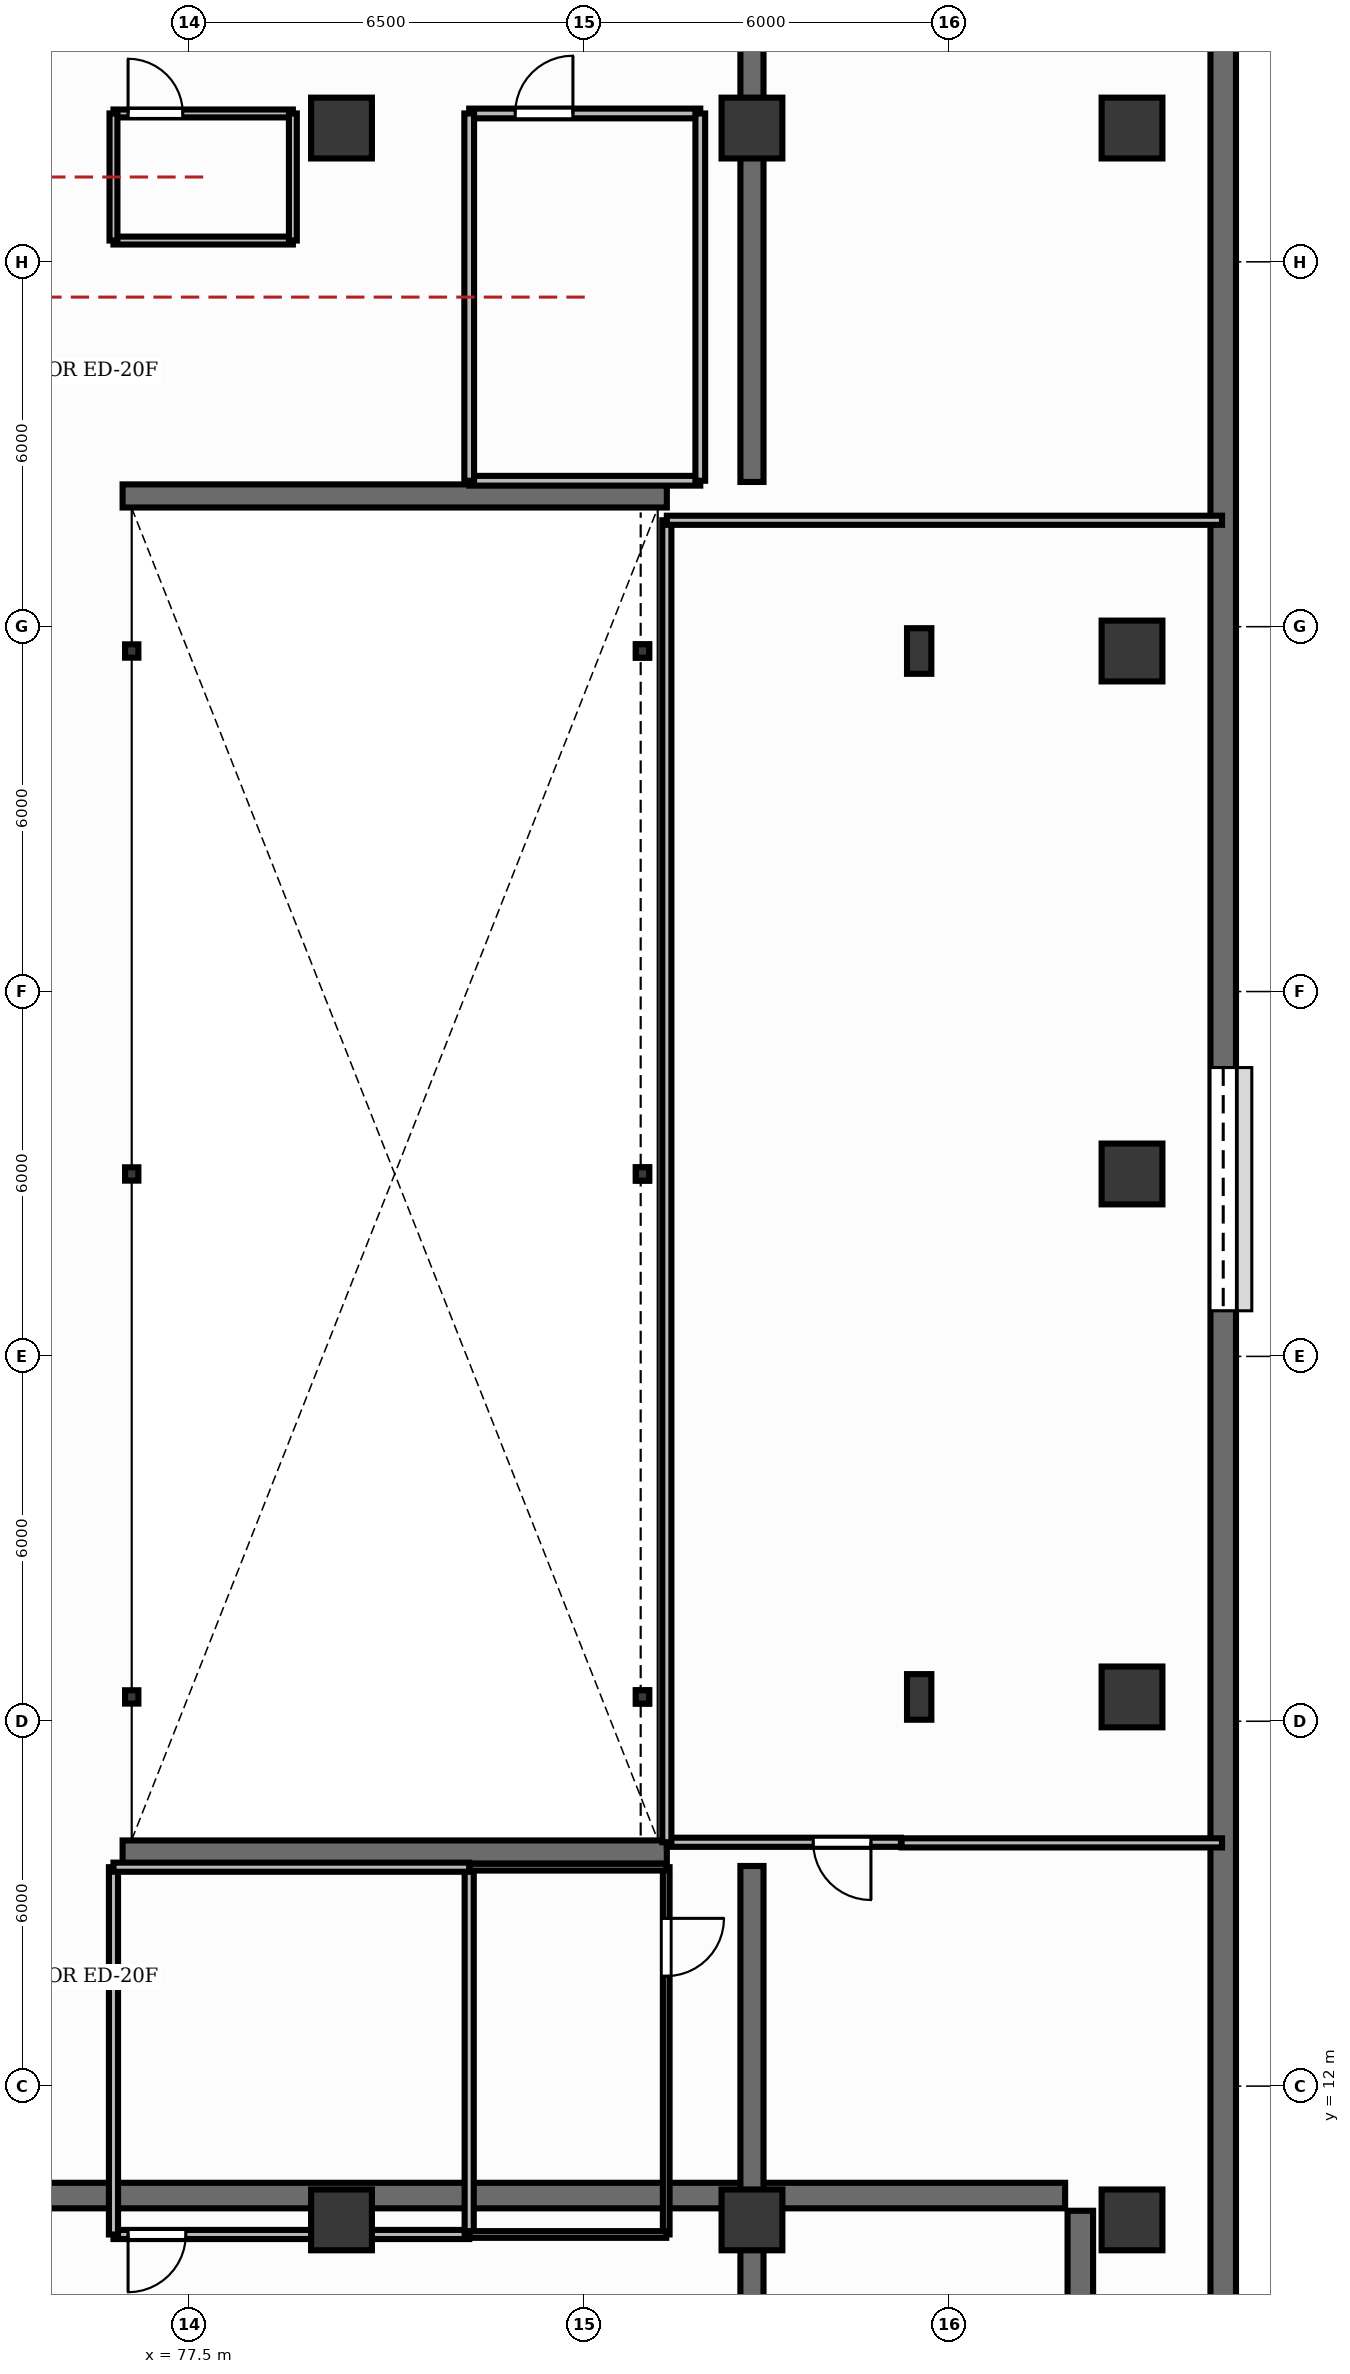
"""IFC4 building model, lengths in metres.
Left out: names, types, materials, properties, quantities, classifications, styles, units other than length and angle.
Written with IfcOpenShell. Run it as: python <this file> out.ifc"""

import sys

from ifc_helpers import new_model, si_unit, direction, frame, frame_2d, origin, origin_2d, place, context, subcontext, project, spatial, rectangle, hollow_circle, i_section, extrude, element, fill, save


model = new_model("IFC4")
c1 = context("Model", 3, precision=1e-05, world=origin(), true_north=direction((0.0, 1.0)))
c2 = subcontext(c1, "Body", "Model", "MODEL_VIEW")
j1 = project(units=[si_unit("LENGTHUNIT", "METRE"), si_unit("PLANEANGLEUNIT", "RADIAN")], contexts=[c1])
p1 = place(None, origin())
s1 = spatial("IfcSite", under=j1, at=p1, CompositionType="ELEMENT")
p2 = place(p1, origin())
s2 = spatial("IfcBuilding", under=s1, at=p2, CompositionType="ELEMENT")
p3 = place(p2, origin())
s3 = spatial("IfcBuildingStorey", under=s2, at=p3, CompositionType="ELEMENT", Elevation=0.0)
p4 = place(p3, frame((64.5, 10.2, 0.0), z_axis=(0.0, 0.0, 1.0), x_axis=(1.0, 0.0, 0.0)))
e1 = element("IfcWall", 1, at=p4, inside=s3, PredefinedType="SHEAR", context=c2, shape_type="SweptSolid", body=[
    extrude(rectangle(XDim=27.4, YDim=0.42, at=frame_2d((13.7, 0.0))), origin(), (0.0, 0.0, 1.0), 3.8),
])
p5 = place(p3, frame((92.15, 3.225, 0.0), z_axis=(0.0, 0.0, 1.0), x_axis=(0.0, 1.0, 0.0)))
e2 = element("IfcWall", 2, at=p5, inside=s3, PredefinedType="SHEAR", context=c2, shape_type="SweptSolid", body=[
    extrude(rectangle(XDim=6.725, YDim=0.42, at=frame_2d((3.362, 0.0))), origin(), (0.0, 0.0, 1.0), 3.8),
])
for number, where, z_axis, x_axis in (
    (3, (80.0, 9.8, 0.0), (0.0, 0.0, 1.0), (1.0, 0.0, 0.0)),
    (4, (80.0, 44.2, 0.0), (0.0, 0.0, 1.0), (1.0, 0.0, 0.0)),
    (5, (86.75, 9.8, 0.0), (0.0, 0.0, 1.0), (1.0, 0.0, 0.0)),
    (6, (86.75, 44.2, 0.0), (0.0, 0.0, 1.0), (1.0, 0.0, 0.0)),
    (7, (93.0, 9.8, 0.0), (0.0, 0.0, 1.0), (1.0, 0.0, 0.0)),
    (8, (93.0, 18.4, 0.0), (0.0, 0.0, 1.0), (1.0, 0.0, 0.0)),
    (9, (93.0, 27.0, 0.0), (0.0, 0.0, 1.0), (1.0, 0.0, 0.0)),
    (10, (93.0, 35.6, 0.0), (0.0, 0.0, 1.0), (1.0, 0.0, 0.0)),
    (11, (93.0, 44.2, 0.0), (0.0, 0.0, 1.0), (1.0, 0.0, 0.0)),
):
    element("IfcColumn", number, at=place(p3, frame(where, z_axis=z_axis, x_axis=x_axis)), inside=s3, PredefinedType="COLUMN", context=c2, shape_type="SweptSolid", body=[
        extrude(rectangle(XDim=1.0, YDim=1.0, at=origin_2d()), origin(), (0.0, 0.0, 1.0), 5.1),
    ])
for number, where, z_axis, x_axis in (
    (12, (89.5, 18.4, 0.0), (0.0, 0.0, 1.0), (1.0, 0.0, 0.0)),
    (13, (89.5, 35.6, 0.0), (0.0, 0.0, 1.0), (1.0, 0.0, 0.0)),
):
    element("IfcColumn", number, at=place(p3, frame(where, z_axis=z_axis, x_axis=x_axis)), inside=s3, PredefinedType="COLUMN", context=c2, shape_type="SweptSolid", body=[
        extrude(i_section(OverallWidth=0.4, OverallDepth=0.75, WebThickness=0.016, FlangeThickness=0.028, at=origin_2d()), origin(), (0.0, 0.0, 1.0), 5.1),
    ])
p6 = place(p3, frame((94.5, 46.75, 0.0), z_axis=(0.0, 0.0, 1.0), x_axis=(0.0, -1.0, 0.0)))
e14 = element("IfcWall", 14, at=p6, inside=s3, PredefinedType="SHEAR", context=c2, shape_type="SweptSolid", body=[
    extrude(rectangle(XDim=39.5, YDim=0.42, at=frame_2d((19.75, 0.0))), origin(), (0.0, 0.0, 1.0), 5.1),
])
p7 = place(p6, frame((18.0, 0.0, 0.0)))
e15 = element("IfcOpeningElement", 15, at=p7, cuts=e14, PredefinedType="OPENING", context=c2, shape_type="SweptSolid", body=[
    extrude(rectangle(XDim=4.0, YDim=4.2, at=frame_2d((2.0, 2.1))), frame((0.0, 0.225, 0.0), z_axis=(0.0, -1.0, 0.0), x_axis=(1.0, 0.0, 0.0)), (0.0, 0.0, 1.0), 0.45),
])
for number, where, z_axis, x_axis in (
    (16, (86.75, 38.38, 0.0), (0.0, 0.0, 1.0), (0.0, 1.0, 0.0)),
    (17, (86.75, 7.21, 0.0), (0.0, 0.0, 1.0), (0.0, 1.0, 0.0)),
):
    element("IfcWall", number, at=place(p3, frame(where, z_axis=z_axis, x_axis=x_axis)), inside=s3, PredefinedType="SHEAR", context=c2, shape_type="SweptSolid", body=[
        extrude(rectangle(XDim=8.41, YDim=0.38, at=frame_2d((4.205, 0.0))), origin(), (0.0, 0.0, 1.0), 5.1),
    ])
for number, where, z_axis, x_axis in (
    (18, (76.4, 15.85, 0.0), (0.0, 0.0, 1.0), (1.0, 0.0, 0.0)),
    (19, (76.4, 38.15, 0.0), (0.0, 0.0, 1.0), (1.0, 0.0, 0.0)),
):
    element("IfcWall", number, at=place(p3, frame(where, z_axis=z_axis, x_axis=x_axis)), inside=s3, PredefinedType="SHEAR", context=c2, shape_type="SweptSolid", body=[
        extrude(rectangle(XDim=8.95, YDim=0.38, at=frame_2d((4.475, 0.0))), origin(), (0.0, 0.0, 1.0), 5.1),
    ])
for number, where, z_axis, x_axis in (
    (20, (84.95, 18.4, -0.32), (0.0, 0.0, 1.0), (1.0, 0.0, 0.0)),
    (21, (84.95, 27.0, -0.32), (0.0, 0.0, 1.0), (1.0, 0.0, 0.0)),
    (22, (84.95, 35.6, -0.32), (0.0, 0.0, 1.0), (1.0, 0.0, 0.0)),
):
    element("IfcColumn", number, at=place(p3, frame(where, z_axis=z_axis, x_axis=x_axis)), inside=s3, PredefinedType="COLUMN", context=c2, shape_type="SweptSolid", body=[
        extrude(hollow_circle(Radius=0.11, WallThickness=0.012, at=origin_2d()), origin(), (0.0, 0.0, 1.0), 1.807),
    ])
p8 = place(p3, frame((84.95, 18.4, 1.487), z_axis=(0.0, 0.0, 1.0), x_axis=(1.0, 0.0, 0.0)))
e23 = element("IfcColumn", 23, at=p8, inside=s3, PredefinedType="COLUMN", context=c2, shape_type="SweptSolid", body=[
    extrude(hollow_circle(Radius=0.11, WallThickness=0.012, at=origin_2d()), origin(), (0.0, 0.0, 1.0), 4.68),
])
p9 = place(p3, frame((76.55, 18.4, -0.725), z_axis=(0.0, 0.0, 1.0), x_axis=(1.0, 0.0, 0.0)))
e24 = element("IfcColumn", 24, at=p9, inside=s3, PredefinedType="COLUMN", context=c2, shape_type="SweptSolid", body=[
    extrude(hollow_circle(Radius=0.11, WallThickness=0.012, at=origin_2d()), origin(), (0.0, 0.0, 1.0), 5.4),
])
p10 = place(p3, frame((84.95, 27.0, 1.487), z_axis=(0.0, 0.0, 1.0), x_axis=(1.0, 0.0, 0.0)))
e25 = element("IfcColumn", 25, at=p10, inside=s3, PredefinedType="COLUMN", context=c2, shape_type="SweptSolid", body=[
    extrude(hollow_circle(Radius=0.11, WallThickness=0.012, at=origin_2d()), origin(), (0.0, 0.0, 1.0), 4.68),
])
p11 = place(p3, frame((76.55, 27.0, -0.725), z_axis=(0.0, 0.0, 1.0), x_axis=(1.0, 0.0, 0.0)))
e26 = element("IfcColumn", 26, at=p11, inside=s3, PredefinedType="COLUMN", context=c2, shape_type="SweptSolid", body=[
    extrude(hollow_circle(Radius=0.11, WallThickness=0.012, at=origin_2d()), origin(), (0.0, 0.0, 1.0), 5.4),
])
p12 = place(p3, frame((84.95, 35.6, 1.487), z_axis=(0.0, 0.0, 1.0), x_axis=(1.0, 0.0, 0.0)))
e27 = element("IfcColumn", 27, at=p12, inside=s3, PredefinedType="COLUMN", context=c2, shape_type="SweptSolid", body=[
    extrude(hollow_circle(Radius=0.11, WallThickness=0.012, at=origin_2d()), origin(), (0.0, 0.0, 1.0), 4.68),
])
p13 = place(p3, frame((76.55, 35.6, -0.725), z_axis=(0.0, 0.0, 1.0), x_axis=(1.0, 0.0, 0.0)))
e28 = element("IfcColumn", 28, at=p13, inside=s3, PredefinedType="COLUMN", context=c2, shape_type="SweptSolid", body=[
    extrude(hollow_circle(Radius=0.11, WallThickness=0.012, at=origin_2d()), origin(), (0.0, 0.0, 1.0), 5.4),
])
p14 = place(p3, frame((76.25, 44.44, 0.0), z_axis=(0.0, 0.0, 1.0), x_axis=(1.0, 0.0, 0.0)))
e29 = element("IfcWall", 29, at=p14, inside=s3, PredefinedType="PARTITIONING", context=c2, shape_type="SweptSolid", body=[
    extrude(rectangle(XDim=2.95, YDim=0.13, at=frame_2d((1.475, 0.0))), origin(), (0.0, 0.0, 1.0), 4.11),
])
p15 = place(p14, frame((0.24, 0.0, 0.0)))
e30 = element("IfcOpeningElement", 30, at=p15, cuts=e29, PredefinedType="OPENING", context=c2, shape_type="SweptSolid", body=[
    extrude(rectangle(XDim=0.9, YDim=2.15, at=frame_2d((0.45, 1.075))), frame((0.0, 0.08, 0.0), z_axis=(0.0, -1.0, 0.0), x_axis=(1.0, 0.0, 0.0)), (0.0, 0.0, 1.0), 0.16),
])
p16 = place(p3, frame((82.1, 9.56, 0.0), z_axis=(0.0, 0.0, 1.0), x_axis=(-1.0, 0.0, 0.0)))
e31 = element("IfcWall", 31, at=p16, inside=s3, PredefinedType="PARTITIONING", context=c2, shape_type="SweptSolid", body=[
    extrude(rectangle(XDim=5.85, YDim=0.15, at=frame_2d((2.925, 0.0))), origin(), (0.0, 0.0, 1.0), 4.11),
])
p17 = place(p16, frame((4.66, 0.0, 0.0)))
e32 = element("IfcOpeningElement", 32, at=p17, cuts=e31, PredefinedType="OPENING", context=c2, shape_type="SweptSolid", body=[
    extrude(rectangle(XDim=0.95, YDim=2.15, at=frame_2d((0.475, 1.075))), frame((0.0, 0.09, 0.0), z_axis=(0.0, -1.0, 0.0), x_axis=(1.0, 0.0, 0.0)), (0.0, 0.0, 1.0), 0.18),
])
p18 = place(p3, frame((85.34, 15.6, 0.0), z_axis=(0.0, 0.0, 1.0), x_axis=(0.0, -1.0, 0.0)))
e33 = element("IfcWall", 33, at=p18, inside=s3, PredefinedType="MOVABLE", context=c2, shape_type="SweptSolid", body=[
    extrude(rectangle(XDim=6.04, YDim=0.11, at=frame_2d((3.02, 0.0))), origin(), (0.0, 0.0, 1.0), 4.11),
])
p19 = place(p18, frame((0.841, 0.0, 0.0)))
e34 = element("IfcOpeningElement", 34, at=p19, cuts=e33, PredefinedType="OPENING", context=c2, shape_type="SweptSolid", body=[
    extrude(rectangle(XDim=0.95, YDim=2.15, at=frame_2d((0.475, 1.075))), frame((0.0, 0.07, 0.0), z_axis=(0.0, -1.0, 0.0), x_axis=(1.0, 0.0, 0.0)), (0.0, 0.0, 1.0), 0.14),
])
p20 = place(p3, frame((82.1, 44.44, 0.0), z_axis=(0.0, 0.0, 1.0), x_axis=(1.0, 0.0, 0.0)))
e35 = element("IfcWall", 35, at=p20, inside=s3, PredefinedType="PARTITIONING", context=c2, shape_type="SweptSolid", body=[
    extrude(rectangle(XDim=3.8, YDim=0.16, at=frame_2d((1.9, 0.0))), origin(), (0.0, 0.0, 1.0), 4.11),
])
p21 = place(p20, frame((0.756, 0.0, 0.0)))
e36 = element("IfcOpeningElement", 36, at=p21, cuts=e35, PredefinedType="OPENING", context=c2, shape_type="SweptSolid", body=[
    extrude(rectangle(XDim=0.95, YDim=2.15, at=frame_2d((0.475, 1.075))), frame((0.0, 0.095, 0.0), z_axis=(0.0, -1.0, 0.0), x_axis=(1.0, 0.0, 0.0)), (0.0, 0.0, 1.0), 0.19),
])
p22 = place(p3, frame((89.2, 16.01, 0.0), z_axis=(0.0, 0.0, 1.0), x_axis=(-1.0, 0.0, 0.0)))
e37 = element("IfcWall", 37, at=p22, inside=s3, PredefinedType="PARTITIONING", context=c2, shape_type="SweptSolid", body=[
    extrude(rectangle(XDim=3.85, YDim=0.15, at=frame_2d((1.925, 0.0))), origin(), (0.0, 0.0, 1.0), 4.11),
])
p23 = place(p22, frame((0.493, 0.0, 0.0)))
e38 = element("IfcOpeningElement", 38, at=p23, cuts=e37, PredefinedType="OPENING", context=c2, shape_type="SweptSolid", body=[
    extrude(rectangle(XDim=0.95, YDim=2.15, at=frame_2d((0.475, 1.075))), frame((0.0, 0.09, 0.0), z_axis=(0.0, -1.0, 0.0), x_axis=(1.0, 0.0, 0.0)), (0.0, 0.0, 1.0), 0.18),
])
p24 = place(p3, frame((79.2, 42.35, 0.0), z_axis=(0.0, 0.0, 1.0), x_axis=(-1.0, 0.0, 0.0)))
e39 = element("IfcWall", 39, at=p24, inside=s3, PredefinedType="PARTITIONING", context=c2, shape_type="SweptSolid", body=[
    extrude(rectangle(XDim=2.95, YDim=0.13, at=frame_2d((1.475, 0.0))), origin(), (0.0, 0.0, 1.0), 4.11),
])
for number, where, z_axis, x_axis in (
    (40, (76.25, 42.35, 0.0), (0.0, 0.0, 1.0), (0.0, 1.0, 0.0)),
    (41, (79.2, 44.44, 0.0), (0.0, 0.0, 1.0), (0.0, -1.0, 0.0)),
):
    element("IfcWall", number, at=place(p3, frame(where, z_axis=z_axis, x_axis=x_axis)), inside=s3, PredefinedType="PARTITIONING", context=c2, shape_type="SweptSolid", body=[
        extrude(rectangle(XDim=2.09, YDim=0.13, at=frame_2d((1.045, 0.0))), origin(), (0.0, 0.0, 1.0), 4.11),
    ])
for number, where, z_axis, x_axis in (
    (42, (82.1, 15.6, 0.0), (0.0, 0.0, 1.0), (0.0, -1.0, 0.0)),
    (43, (76.25, 9.56, 0.0), (0.0, 0.0, 1.0), (0.0, 1.0, 0.0)),
):
    element("IfcWall", number, at=place(p3, frame(where, z_axis=z_axis, x_axis=x_axis)), inside=s3, PredefinedType="PARTITIONING", context=c2, shape_type="SweptSolid", body=[
        extrude(rectangle(XDim=6.04, YDim=0.15, at=frame_2d((3.02, 0.0))), origin(), (0.0, 0.0, 1.0), 4.11),
    ])
p25 = place(p3, frame((76.25, 15.6, 0.0), z_axis=(0.0, 0.0, 1.0), x_axis=(1.0, 0.0, 0.0)))
e44 = element("IfcWall", 44, at=p25, inside=s3, PredefinedType="PARTITIONING", context=c2, shape_type="SweptSolid", body=[
    extrude(rectangle(XDim=5.85, YDim=0.15, at=frame_2d((2.925, 0.0))), origin(), (0.0, 0.0, 1.0), 4.11),
])
for number, where, z_axis, x_axis in (
    (45, (85.34, 9.56, 0.0), (0.0, 0.0, 1.0), (-1.0, 0.0, 0.0)),
    (46, (82.11, 15.6, 0.0), (0.0, 0.0, 1.0), (1.0, 0.0, 0.0)),
):
    element("IfcWall", number, at=place(p3, frame(where, z_axis=z_axis, x_axis=x_axis)), inside=s3, PredefinedType="MOVABLE", context=c2, shape_type="SweptSolid", body=[
        extrude(rectangle(XDim=3.23, YDim=0.11, at=frame_2d((1.615, 0.0))), origin(), (0.0, 0.0, 1.0), 4.11),
    ])
p26 = place(p3, frame((85.9, 38.4, 0.0), z_axis=(0.0, 0.0, 1.0), x_axis=(-1.0, 0.0, 0.0)))
e47 = element("IfcWall", 47, at=p26, inside=s3, PredefinedType="PARTITIONING", context=c2, shape_type="SweptSolid", body=[
    extrude(rectangle(XDim=3.8, YDim=0.16, at=frame_2d((1.9, 0.0))), origin(), (0.0, 0.0, 1.0), 4.11),
])
for number, where, z_axis, x_axis in (
    (48, (82.1, 38.4, 0.0), (0.0, 0.0, 1.0), (0.0, 1.0, 0.0)),
    (49, (85.9, 44.44, 0.0), (0.0, 0.0, 1.0), (0.0, -1.0, 0.0)),
):
    element("IfcWall", number, at=place(p3, frame(where, z_axis=z_axis, x_axis=x_axis)), inside=s3, PredefinedType="PARTITIONING", context=c2, shape_type="SweptSolid", body=[
        extrude(rectangle(XDim=6.04, YDim=0.16, at=frame_2d((3.02, 0.0))), origin(), (0.0, 0.0, 1.0), 4.11),
    ])
p27 = place(p3, frame((94.48, 16.0, 0.0), z_axis=(0.0, 0.0, 1.0), x_axis=(-1.0, 0.0, 0.0)))
e50 = element("IfcWall", 50, at=p27, inside=s3, PredefinedType="PARTITIONING", context=c2, shape_type="SweptSolid", body=[
    extrude(rectangle(XDim=5.27, YDim=0.15, at=frame_2d((2.635, 0.0))), origin(), (0.0, 0.0, 1.0), 4.11),
])
p28 = place(p3, frame((85.35, 16.01, 0.0), z_axis=(0.0, 0.0, 1.0), x_axis=(0.0, 1.0, 0.0)))
e51 = element("IfcWall", 51, at=p28, inside=s3, PredefinedType="PARTITIONING", context=c2, shape_type="SweptSolid", body=[
    extrude(rectangle(XDim=21.74, YDim=0.15, at=frame_2d((10.87, 0.0))), origin(), (0.0, 0.0, 1.0), 4.11),
])
p29 = place(p3, frame((85.35, 37.75, 0.0), z_axis=(0.0, 0.0, 1.0), x_axis=(1.0, 0.0, 0.0)))
e52 = element("IfcWall", 52, at=p29, inside=s3, PredefinedType="PARTITIONING", context=c2, shape_type="SweptSolid", body=[
    extrude(rectangle(XDim=9.13, YDim=0.15, at=frame_2d((4.565, 0.0))), origin(), (0.0, 0.0, 1.0), 4.11),
])
p30 = place(p7, origin())
e53 = element("IfcDoor", 53, at=p30, inside=s3, OperationType="ROLLINGUP", PredefinedType="DOOR", context=c2, shape_type="SweptSolid", body=[
    extrude(rectangle(XDim=4.0, YDim=4.2, at=frame_2d((2.0, 2.1))), frame((0.0, 0.025, 0.0), z_axis=(0.0, -1.0, 0.0), x_axis=(1.0, 0.0, 0.0)), (0.0, 0.0, 1.0), 0.05),
])
fill(e15, e53)
p31 = place(p15, origin())
e54 = element("IfcDoor", 54, at=p31, inside=s3, OperationType="SINGLE_SWING_LEFT", PredefinedType="DOOR", context=c2, shape_type="SweptSolid", body=[
    extrude(rectangle(XDim=0.9, YDim=2.15, at=frame_2d((0.45, 1.075))), frame((0.0, 0.025, 0.0), z_axis=(0.0, -1.0, 0.0), x_axis=(1.0, 0.0, 0.0)), (0.0, 0.0, 1.0), 0.05),
])
fill(e30, e54)
p32 = place(p17, origin())
e55 = element("IfcDoor", 55, at=p32, inside=s3, OperationType="SINGLE_SWING_RIGHT", PredefinedType="DOOR", context=c2, shape_type="SweptSolid", body=[
    extrude(rectangle(XDim=0.95, YDim=2.15, at=frame_2d((0.475, 1.075))), frame((0.0, 0.025, 0.0), z_axis=(0.0, -1.0, 0.0), x_axis=(1.0, 0.0, 0.0)), (0.0, 0.0, 1.0), 0.05),
])
fill(e32, e55)
p33 = place(p19, origin())
e56 = element("IfcDoor", 56, at=p33, inside=s3, OperationType="SINGLE_SWING_LEFT", PredefinedType="DOOR", context=c2, shape_type="SweptSolid", body=[
    extrude(rectangle(XDim=0.95, YDim=2.15, at=frame_2d((0.475, 1.075))), frame((0.0, 0.025, 0.0), z_axis=(0.0, -1.0, 0.0), x_axis=(1.0, 0.0, 0.0)), (0.0, 0.0, 1.0), 0.05),
])
fill(e34, e56)
p34 = place(p21, origin())
e57 = element("IfcDoor", 57, at=p34, inside=s3, OperationType="SINGLE_SWING_RIGHT", PredefinedType="DOOR", context=c2, shape_type="SweptSolid", body=[
    extrude(rectangle(XDim=0.95, YDim=2.15, at=frame_2d((0.475, 1.075))), frame((0.0, 0.025, 0.0), z_axis=(0.0, -1.0, 0.0), x_axis=(1.0, 0.0, 0.0)), (0.0, 0.0, 1.0), 0.05),
])
fill(e36, e57)
p35 = place(p23, origin())
e58 = element("IfcDoor", 58, at=p35, inside=s3, OperationType="SINGLE_SWING_LEFT", PredefinedType="DOOR", context=c2, shape_type="SweptSolid", body=[
    extrude(rectangle(XDim=0.95, YDim=2.15, at=frame_2d((0.475, 1.075))), frame((0.0, 0.025, 0.0), z_axis=(0.0, -1.0, 0.0), x_axis=(1.0, 0.0, 0.0)), (0.0, 0.0, 1.0), 0.05),
])
fill(e38, e58)
save(model, sys.argv[1])
